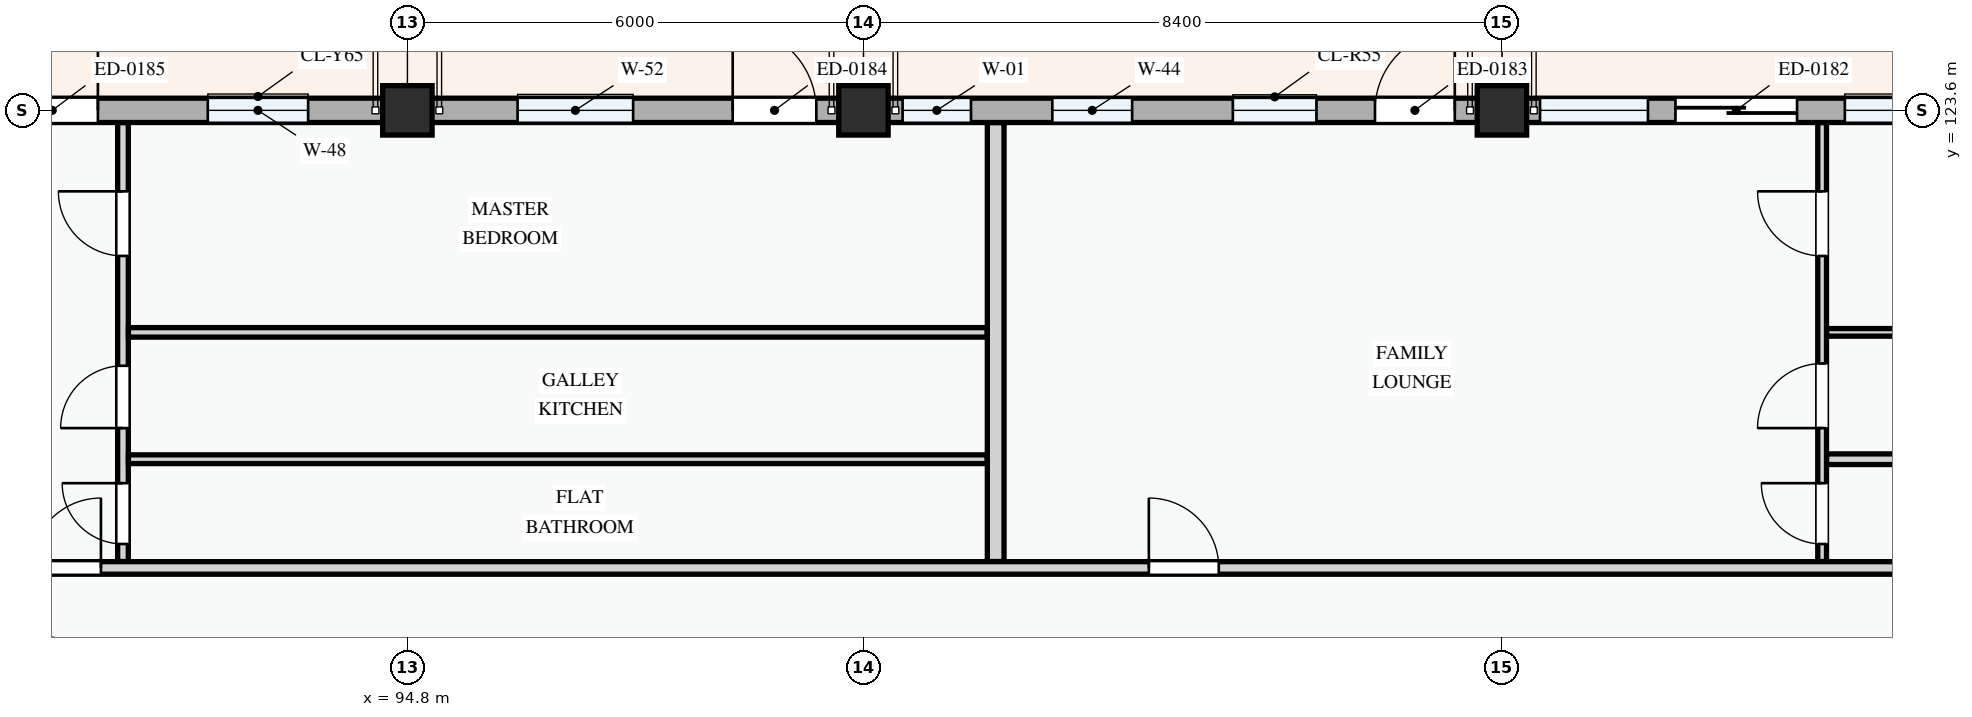
"""IFC4 building model, lengths in metres.
Left out: names, types, materials, properties, quantities, classifications, styles, units other than length and angle.
Written with IfcOpenShell. Run it as: python <this file> out.ifc"""

import sys

from ifc_helpers import new_model, si_unit, direction, frame, frame_2d, origin, origin_2d, place, context, subcontext, project, spatial, rectangle, extrude, element, fill, save


model = new_model("IFC4")
c1 = context("Model", 3, precision=1e-05, world=origin(), true_north=direction((0.0, 1.0)))
c2 = subcontext(c1, "Body", "Model", "MODEL_VIEW")
j1 = project(units=[si_unit("LENGTHUNIT", "METRE"), si_unit("PLANEANGLEUNIT", "RADIAN")], contexts=[c1])
p1 = place(None, origin())
s1 = spatial("IfcSite", under=j1, at=p1, CompositionType="ELEMENT")
p2 = place(p1, origin())
s2 = spatial("IfcBuilding", under=s1, at=p2, CompositionType="ELEMENT")
p3 = place(p2, frame((0.0, 0.0, 18.0)))
s3 = spatial("IfcBuildingStorey", under=s2, at=p3, CompositionType="ELEMENT", Elevation=18.0)
for number, where, z_axis, x_axis in (
    (1, (94.8, 123.6, 0.0), (0.0, 0.0, 1.0), (1.0, 0.0, 0.0)),
    (2, (100.8, 123.6, 0.0), (0.0, 0.0, 1.0), (1.0, 0.0, 0.0)),
    (3, (109.2, 123.6, 0.0), (0.0, 0.0, 1.0), (1.0, 0.0, 0.0)),
):
    element("IfcColumn", number, at=place(p3, frame(where, z_axis=z_axis, x_axis=x_axis)), inside=s3, PredefinedType="COLUMN", context=c2, shape_type="SweptSolid", body=[
        extrude(rectangle(XDim=0.65, YDim=0.65, at=origin_2d()), origin(), (0.0, 0.0, 1.0), 3.3),
    ])
p4 = place(p3, frame((115.2, 123.6, 0.0), z_axis=(0.0, 0.0, 1.0), x_axis=(-1.0, 0.0, 0.0)))
e4 = element("IfcWall", 4, at=p4, inside=s3, PredefinedType="STANDARD", context=c2, shape_type="SweptSolid", body=[
    extrude(rectangle(XDim=6.0, YDim=0.32, at=frame_2d((3.0, 0.0))), origin(), (0.0, 0.0, 1.0), 2.475),
])
p5 = place(p4, frame((2.117, 0.0, 0.0)))
e5 = element("IfcOpeningElement", 5, at=p5, cuts=e4, PredefinedType="OPENING", context=c2, shape_type="SweptSolid", body=[
    extrude(rectangle(XDim=1.6, YDim=2.2, at=frame_2d((0.8, 1.1))), frame((0.0, 0.17, 0.0), z_axis=(0.0, -1.0, 0.0), x_axis=(1.0, 0.0, 0.0)), (0.0, 0.0, 1.0), 0.34),
])
p6 = place(p4, frame((0.489, 0.0, 0.78)))
e6 = element("IfcOpeningElement", 6, at=p6, cuts=e4, PredefinedType="OPENING", context=c2, shape_type="SweptSolid", body=[
    extrude(rectangle(XDim=1.0, YDim=1.25, at=frame_2d((0.5, 0.625))), frame((0.0, 0.17, 0.0), z_axis=(0.0, -1.0, 0.0), x_axis=(1.0, 0.0, 0.0)), (0.0, 0.0, 1.0), 0.34),
])
p7 = place(p4, frame((4.079, 0.0, 0.78)))
e7 = element("IfcOpeningElement", 7, at=p7, cuts=e4, PredefinedType="OPENING", context=c2, shape_type="SweptSolid", body=[
    extrude(rectangle(XDim=1.42, YDim=1.38, at=frame_2d((0.71, 0.69))), frame((0.0, 0.17, 0.0), z_axis=(0.0, -1.0, 0.0), x_axis=(1.0, 0.0, 0.0)), (0.0, 0.0, 1.0), 0.34),
])
p8 = place(p3, frame((109.2, 123.6, 0.0), z_axis=(0.0, 0.0, 1.0), x_axis=(-1.0, 0.0, 0.0)))
e8 = element("IfcWall", 8, at=p8, inside=s3, PredefinedType="STANDARD", context=c2, shape_type="SweptSolid", body=[
    extrude(rectangle(XDim=8.4, YDim=0.32, at=frame_2d((4.2, 0.0))), origin(), (0.0, 0.0, 1.0), 2.375),
])
p9 = place(p8, frame((0.62, 0.0, 0.0)))
e9 = element("IfcOpeningElement", 9, at=p9, cuts=e8, PredefinedType="OPENING", context=c2, shape_type="SweptSolid", body=[
    extrude(rectangle(XDim=1.05, YDim=2.15, at=frame_2d((0.525, 1.075))), frame((0.0, 0.17, 0.0), z_axis=(0.0, -1.0, 0.0), x_axis=(1.0, 0.0, 0.0)), (0.0, 0.0, 1.0), 0.34),
])
p10 = place(p8, frame((2.44, 0.0, 0.78)))
e10 = element("IfcOpeningElement", 10, at=p10, cuts=e8, PredefinedType="OPENING", context=c2, shape_type="SweptSolid", body=[
    extrude(rectangle(XDim=1.1, YDim=1.3, at=frame_2d((0.55, 0.65))), frame((0.0, 0.17, 0.0), z_axis=(0.0, -1.0, 0.0), x_axis=(1.0, 0.0, 0.0)), (0.0, 0.0, 1.0), 0.34),
])
p11 = place(p8, frame((4.865, 0.0, 0.78)))
e11 = element("IfcOpeningElement", 11, at=p11, cuts=e8, PredefinedType="OPENING", context=c2, shape_type="SweptSolid", body=[
    extrude(rectangle(XDim=1.05, YDim=1.2, at=frame_2d((0.525, 0.6))), frame((0.0, 0.17, 0.0), z_axis=(0.0, -1.0, 0.0), x_axis=(1.0, 0.0, 0.0)), (0.0, 0.0, 1.0), 0.34),
])
p12 = place(p8, frame((6.985, 0.0, 0.78)))
e12 = element("IfcOpeningElement", 12, at=p12, cuts=e8, PredefinedType="OPENING", context=c2, shape_type="SweptSolid", body=[
    extrude(rectangle(XDim=0.9, YDim=1.2, at=frame_2d((0.45, 0.6))), frame((0.0, 0.17, 0.0), z_axis=(0.0, -1.0, 0.0), x_axis=(1.0, 0.0, 0.0)), (0.0, 0.0, 1.0), 0.34),
])
p13 = place(p3, frame((100.8, 123.6, 0.0), z_axis=(0.0, 0.0, 1.0), x_axis=(-1.0, 0.0, 0.0)))
e13 = element("IfcWall", 13, at=p13, inside=s3, PredefinedType="STANDARD", context=c2, shape_type="SweptSolid", body=[
    extrude(rectangle(XDim=6.0, YDim=0.32, at=frame_2d((3.0, 0.0))), origin(), (0.0, 0.0, 1.0), 2.475),
])
p14 = place(p13, frame((0.62, 0.0, 0.0)))
e14 = element("IfcOpeningElement", 14, at=p14, cuts=e13, PredefinedType="OPENING", context=c2, shape_type="SweptSolid", body=[
    extrude(rectangle(XDim=1.1, YDim=2.15, at=frame_2d((0.55, 1.075))), frame((0.0, 0.17, 0.0), z_axis=(0.0, -1.0, 0.0), x_axis=(1.0, 0.0, 0.0)), (0.0, 0.0, 1.0), 0.34),
])
p15 = place(p13, frame((3.03, 0.0, 0.78)))
e15 = element("IfcOpeningElement", 15, at=p15, cuts=e13, PredefinedType="OPENING", context=c2, shape_type="SweptSolid", body=[
    extrude(rectangle(XDim=1.52, YDim=1.42, at=frame_2d((0.76, 0.71))), frame((0.0, 0.17, 0.0), z_axis=(0.0, -1.0, 0.0), x_axis=(1.0, 0.0, 0.0)), (0.0, 0.0, 1.0), 0.34),
])
p16 = place(p3, frame((94.8, 123.6, 0.0), z_axis=(0.0, 0.0, 1.0), x_axis=(-1.0, 0.0, 0.0)))
e16 = element("IfcWall", 16, at=p16, inside=s3, PredefinedType="STANDARD", context=c2, shape_type="SweptSolid", body=[
    extrude(rectangle(XDim=8.4, YDim=0.32, at=frame_2d((4.2, 0.0))), origin(), (0.0, 0.0, 1.0), 2.375),
])
p17 = place(p16, frame((4.072, 0.0, 0.0)))
e17 = element("IfcOpeningElement", 17, at=p17, cuts=e16, PredefinedType="OPENING", context=c2, shape_type="SweptSolid", body=[
    extrude(rectangle(XDim=1.2, YDim=2.15, at=frame_2d((0.6, 1.075))), frame((0.0, 0.17, 0.0), z_axis=(0.0, -1.0, 0.0), x_axis=(1.0, 0.0, 0.0)), (0.0, 0.0, 1.0), 0.34),
])
p18 = place(p16, frame((1.306, 0.0, 0.78)))
e18 = element("IfcOpeningElement", 18, at=p18, cuts=e16, PredefinedType="OPENING", context=c2, shape_type="SweptSolid", body=[
    extrude(rectangle(XDim=1.32, YDim=1.35, at=frame_2d((0.66, 0.675))), frame((0.0, 0.17, 0.0), z_axis=(0.0, -1.0, 0.0), x_axis=(1.0, 0.0, 0.0)), (0.0, 0.0, 1.0), 0.34),
])
p19 = place(p16, frame((6.141, 0.0, 0.78)))
e19 = element("IfcOpeningElement", 19, at=p19, cuts=e16, PredefinedType="OPENING", context=c2, shape_type="SweptSolid", body=[
    extrude(rectangle(XDim=1.25, YDim=1.45, at=frame_2d((0.625, 0.725))), frame((0.0, 0.17, 0.0), z_axis=(0.0, -1.0, 0.0), x_axis=(1.0, 0.0, 0.0)), (0.0, 0.0, 1.0), 0.34),
])
p20 = place(p3, frame((91.058, 117.665, 0.0), z_axis=(0.0, 0.0, 1.0), x_axis=(0.0, 1.0, 0.0)))
e20 = element("IfcWall", 20, at=p20, inside=s3, PredefinedType="PARTITIONING", context=c2, shape_type="SweptSolid", body=[
    extrude(rectangle(XDim=5.773, YDim=0.14, at=frame_2d((2.887, 0.0))), origin(), (0.0, 0.0, 1.0), 3.0),
])
p21 = place(p20, frame((0.231, 0.0, 0.0)))
e21 = element("IfcOpeningElement", 21, at=p21, cuts=e20, PredefinedType="OPENING", context=c2, shape_type="SweptSolid", body=[
    extrude(rectangle(XDim=0.8, YDim=2.1, at=frame_2d((0.4, 1.05))), frame((0.0, 0.08, 0.0), z_axis=(0.0, -1.0, 0.0), x_axis=(1.0, 0.0, 0.0)), (0.0, 0.0, 1.0), 0.16),
])
p22 = place(p20, frame((1.755, 0.0, 0.0)))
e22 = element("IfcOpeningElement", 22, at=p22, cuts=e20, PredefinedType="OPENING", context=c2, shape_type="SweptSolid", body=[
    extrude(rectangle(XDim=0.82, YDim=2.08, at=frame_2d((0.41, 1.04))), frame((0.0, 0.08, 0.0), z_axis=(0.0, -1.0, 0.0), x_axis=(1.0, 0.0, 0.0)), (0.0, 0.0, 1.0), 0.16),
])
p23 = place(p20, frame((4.02, 0.0, 0.0)))
e23 = element("IfcOpeningElement", 23, at=p23, cuts=e20, PredefinedType="OPENING", context=c2, shape_type="SweptSolid", body=[
    extrude(rectangle(XDim=0.85, YDim=2.1, at=frame_2d((0.425, 1.05))), frame((0.0, 0.08, 0.0), z_axis=(0.0, -1.0, 0.0), x_axis=(1.0, 0.0, 0.0)), (0.0, 0.0, 1.0), 0.16),
])
p24 = place(p3, frame((91.13, 120.679, 0.0), z_axis=(0.0, 0.0, 1.0), x_axis=(1.0, 0.0, 0.0)))
e24 = element("IfcWall", 24, at=p24, inside=s3, PredefinedType="PARTITIONING", context=c2, shape_type="SweptSolid", body=[
    extrude(rectangle(XDim=11.298, YDim=0.125, at=frame_2d((5.649, 0.0))), origin(), (0.0, 0.0, 1.0), 3.0),
])
p25 = place(p3, frame((91.13, 119.01, 0.0), z_axis=(0.0, 0.0, 1.0), x_axis=(1.0, 0.0, 0.0)))
e25 = element("IfcWall", 25, at=p25, inside=s3, PredefinedType="PARTITIONING", context=c2, shape_type="SweptSolid", body=[
    extrude(rectangle(XDim=11.298, YDim=0.115, at=frame_2d((5.649, 0.0))), origin(), (0.0, 0.0, 1.0), 3.0),
])
p26 = place(p3, frame((113.413, 117.665, 0.0), z_axis=(0.0, 0.0, 1.0), x_axis=(0.0, 1.0, 0.0)))
e26 = element("IfcWall", 26, at=p26, inside=s3, PredefinedType="PARTITIONING", context=c2, shape_type="SweptSolid", body=[
    extrude(rectangle(XDim=5.773, YDim=0.115, at=frame_2d((2.887, 0.0))), origin(), (0.0, 0.0, 1.0), 3.0),
])
p27 = place(p26, frame((0.231, 0.0, 0.0)))
e27 = element("IfcOpeningElement", 27, at=p27, cuts=e26, PredefinedType="OPENING", context=c2, shape_type="SweptSolid", body=[
    extrude(rectangle(XDim=0.8, YDim=2.1, at=frame_2d((0.4, 1.05))), frame((0.0, 0.067, 0.0), z_axis=(0.0, -1.0, 0.0), x_axis=(1.0, 0.0, 0.0)), (0.0, 0.0, 1.0), 0.135),
])
p28 = place(p26, frame((1.755, 0.0, 0.0)))
e28 = element("IfcOpeningElement", 28, at=p28, cuts=e26, PredefinedType="OPENING", context=c2, shape_type="SweptSolid", body=[
    extrude(rectangle(XDim=0.85, YDim=2.1, at=frame_2d((0.425, 1.05))), frame((0.0, 0.067, 0.0), z_axis=(0.0, -1.0, 0.0), x_axis=(1.0, 0.0, 0.0)), (0.0, 0.0, 1.0), 0.135),
])
p29 = place(p26, frame((4.02, 0.0, 0.0)))
e29 = element("IfcOpeningElement", 29, at=p29, cuts=e26, PredefinedType="OPENING", context=c2, shape_type="SweptSolid", body=[
    extrude(rectangle(XDim=0.85, YDim=2.1, at=frame_2d((0.425, 1.05))), frame((0.0, 0.067, 0.0), z_axis=(0.0, -1.0, 0.0), x_axis=(1.0, 0.0, 0.0)), (0.0, 0.0, 1.0), 0.135),
])
p30 = place(p3, frame((113.472, 120.679, 0.0), z_axis=(0.0, 0.0, 1.0), x_axis=(1.0, 0.0, 0.0)))
e30 = element("IfcWall", 30, at=p30, inside=s3, PredefinedType="PARTITIONING", context=c2, shape_type="SweptSolid", body=[
    extrude(rectangle(XDim=11.826, YDim=0.1, at=frame_2d((5.913, 0.0))), origin(), (0.0, 0.0, 1.0), 3.0),
])
p31 = place(p3, frame((113.472, 119.01, 0.0), z_axis=(0.0, 0.0, 1.0), x_axis=(1.0, 0.0, 0.0)))
e31 = element("IfcWall", 31, at=p31, inside=s3, PredefinedType="PARTITIONING", context=c2, shape_type="SweptSolid", body=[
    extrude(rectangle(XDim=11.826, YDim=0.14, at=frame_2d((5.913, 0.0))), origin(), (0.0, 0.0, 1.0), 3.0),
])
p32 = place(p3, frame((102.54, 117.665, 0.0), z_axis=(0.0, 0.0, 1.0), x_axis=(0.0, 1.0, 0.0)))
e32 = element("IfcWall", 32, at=p32, inside=s3, PredefinedType="PARTITIONING", context=c2, shape_type="SweptSolid", body=[
    extrude(rectangle(XDim=5.773, YDim=0.22, at=frame_2d((2.887, 0.0))), origin(), (0.0, 0.0, 1.0), 3.0),
])
p33 = place(p3, frame((80.562, 117.58, 0.0), z_axis=(0.0, 0.0, 1.0), x_axis=(1.0, 0.0, 0.0)))
e33 = element("IfcWall", 33, at=p33, inside=s3, PredefinedType="PARTITIONING", context=c2, shape_type="SweptSolid", body=[
    extrude(rectangle(XDim=71.978, YDim=0.165, at=frame_2d((35.989, 0.0))), origin(), (0.0, 0.0, 1.0), 3.0),
])
p34 = place(p33, frame((9.286, 0.0, 0.0)))
e34 = element("IfcOpeningElement", 34, at=p34, cuts=e33, PredefinedType="OPENING", context=c2, shape_type="SweptSolid", body=[
    extrude(rectangle(XDim=0.92, YDim=2.1, at=frame_2d((0.46, 1.05))), frame((0.0, 0.093, 0.0), z_axis=(0.0, -1.0, 0.0), x_axis=(1.0, 0.0, 0.0)), (0.0, 0.0, 1.0), 0.185),
])
p35 = place(p33, frame((23.993, 0.0, 0.0)))
e35 = element("IfcOpeningElement", 35, at=p35, cuts=e33, PredefinedType="OPENING", context=c2, shape_type="SweptSolid", body=[
    extrude(rectangle(XDim=0.92, YDim=2.1, at=frame_2d((0.46, 1.05))), frame((0.0, 0.093, 0.0), z_axis=(0.0, -1.0, 0.0), x_axis=(1.0, 0.0, 0.0)), (0.0, 0.0, 1.0), 0.185),
])
p36 = place(p33, frame((52.703, 0.0, 0.0)))
e36 = element("IfcOpeningElement", 36, at=p36, cuts=e33, PredefinedType="OPENING", context=c2, shape_type="SweptSolid", body=[
    extrude(rectangle(XDim=0.96, YDim=2.12, at=frame_2d((0.48, 1.06))), frame((0.0, 0.093, 0.0), z_axis=(0.0, -1.0, 0.0), x_axis=(1.0, 0.0, 0.0)), (0.0, 0.0, 1.0), 0.185),
])
p37 = place(p5, frame((1.6, 0.0, 0.0), z_axis=(0.0, 0.0, 1.0), x_axis=(-1.0, 0.0, 0.0)))
e37 = element("IfcDoor", 37, at=p37, inside=s3, OperationType="SLIDING_TO_LEFT", PredefinedType="DOOR", context=c2, shape_type="SweptSolid", body=[
    extrude(rectangle(XDim=1.6, YDim=2.2, at=frame_2d((0.8, 1.1))), frame((0.0, 0.025, 0.0), z_axis=(0.0, -1.0, 0.0), x_axis=(1.0, 0.0, 0.0)), (0.0, 0.0, 1.0), 0.05),
])
fill(e5, e37)
p38 = place(p6, origin())
e38 = element("IfcWindow", 38, at=p38, inside=s3, PartitioningType="SINGLE_PANEL", PredefinedType="WINDOW", context=c2, shape_type="SweptSolid", body=[
    extrude(rectangle(XDim=1.0, YDim=1.25, at=frame_2d((0.5, 0.625))), frame((0.0, 0.03, 0.0), z_axis=(0.0, -1.0, 0.0), x_axis=(1.0, 0.0, 0.0)), (0.0, 0.0, 1.0), 0.06),
])
fill(e6, e38)
p39 = place(p7, origin())
e39 = element("IfcWindow", 39, at=p39, inside=s3, PartitioningType="SINGLE_PANEL", PredefinedType="WINDOW", context=c2, shape_type="SweptSolid", body=[
    extrude(rectangle(XDim=1.42, YDim=1.38, at=frame_2d((0.71, 0.69))), frame((0.0, 0.03, 0.0), z_axis=(0.0, -1.0, 0.0), x_axis=(1.0, 0.0, 0.0)), (0.0, 0.0, 1.0), 0.06),
])
fill(e7, e39)
p40 = place(p9, frame((1.05, 0.0, 0.0), z_axis=(0.0, 0.0, 1.0), x_axis=(-1.0, 0.0, 0.0)))
e40 = element("IfcDoor", 40, at=p40, inside=s3, OperationType="SINGLE_SWING_RIGHT", PredefinedType="DOOR", context=c2, shape_type="SweptSolid", body=[
    extrude(rectangle(XDim=1.05, YDim=2.15, at=frame_2d((0.525, 1.075))), frame((0.0, 0.025, 0.0), z_axis=(0.0, -1.0, 0.0), x_axis=(1.0, 0.0, 0.0)), (0.0, 0.0, 1.0), 0.05),
])
fill(e9, e40)
p41 = place(p10, origin())
e41 = element("IfcWindow", 41, at=p41, inside=s3, PartitioningType="SINGLE_PANEL", PredefinedType="WINDOW", context=c2, shape_type="SweptSolid", body=[
    extrude(rectangle(XDim=1.1, YDim=1.3, at=frame_2d((0.55, 0.65))), frame((0.0, 0.03, 0.0), z_axis=(0.0, -1.0, 0.0), x_axis=(1.0, 0.0, 0.0)), (0.0, 0.0, 1.0), 0.06),
])
fill(e10, e41)
p42 = place(p11, origin())
e42 = element("IfcWindow", 42, at=p42, inside=s3, PartitioningType="SINGLE_PANEL", PredefinedType="WINDOW", context=c2, shape_type="SweptSolid", body=[
    extrude(rectangle(XDim=1.05, YDim=1.2, at=frame_2d((0.525, 0.6))), frame((0.0, 0.03, 0.0), z_axis=(0.0, -1.0, 0.0), x_axis=(1.0, 0.0, 0.0)), (0.0, 0.0, 1.0), 0.06),
])
fill(e11, e42)
p43 = place(p12, origin())
e43 = element("IfcWindow", 43, at=p43, inside=s3, PartitioningType="SINGLE_PANEL", PredefinedType="WINDOW", context=c2, shape_type="SweptSolid", body=[
    extrude(rectangle(XDim=0.9, YDim=1.2, at=frame_2d((0.45, 0.6))), frame((0.0, 0.03, 0.0), z_axis=(0.0, -1.0, 0.0), x_axis=(1.0, 0.0, 0.0)), (0.0, 0.0, 1.0), 0.06),
])
fill(e12, e43)
p44 = place(p14, frame((1.1, 0.0, 0.0), z_axis=(0.0, 0.0, 1.0), x_axis=(-1.0, 0.0, 0.0)))
e44 = element("IfcDoor", 44, at=p44, inside=s3, OperationType="SINGLE_SWING_LEFT", PredefinedType="DOOR", context=c2, shape_type="SweptSolid", body=[
    extrude(rectangle(XDim=1.1, YDim=2.15, at=frame_2d((0.55, 1.075))), frame((0.0, 0.025, 0.0), z_axis=(0.0, -1.0, 0.0), x_axis=(1.0, 0.0, 0.0)), (0.0, 0.0, 1.0), 0.05),
])
fill(e14, e44)
p45 = place(p15, origin())
e45 = element("IfcWindow", 45, at=p45, inside=s3, PartitioningType="SINGLE_PANEL", PredefinedType="WINDOW", context=c2, shape_type="SweptSolid", body=[
    extrude(rectangle(XDim=1.52, YDim=1.42, at=frame_2d((0.76, 0.71))), frame((0.0, 0.03, 0.0), z_axis=(0.0, -1.0, 0.0), x_axis=(1.0, 0.0, 0.0)), (0.0, 0.0, 1.0), 0.06),
])
fill(e15, e45)
p46 = place(p17, frame((1.2, 0.0, 0.0), z_axis=(0.0, 0.0, 1.0), x_axis=(-1.0, 0.0, 0.0)))
e46 = element("IfcDoor", 46, at=p46, inside=s3, OperationType="SINGLE_SWING_RIGHT", PredefinedType="DOOR", context=c2, shape_type="SweptSolid", body=[
    extrude(rectangle(XDim=1.2, YDim=2.15, at=frame_2d((0.6, 1.075))), frame((0.0, 0.025, 0.0), z_axis=(0.0, -1.0, 0.0), x_axis=(1.0, 0.0, 0.0)), (0.0, 0.0, 1.0), 0.05),
])
fill(e17, e46)
p47 = place(p18, origin())
e47 = element("IfcWindow", 47, at=p47, inside=s3, PartitioningType="SINGLE_PANEL", PredefinedType="WINDOW", context=c2, shape_type="SweptSolid", body=[
    extrude(rectangle(XDim=1.32, YDim=1.35, at=frame_2d((0.66, 0.675))), frame((0.0, 0.03, 0.0), z_axis=(0.0, -1.0, 0.0), x_axis=(1.0, 0.0, 0.0)), (0.0, 0.0, 1.0), 0.06),
])
fill(e18, e47)
p48 = place(p21, origin())
e48 = element("IfcDoor", 48, at=p48, inside=s3, OperationType="SINGLE_SWING_RIGHT", PredefinedType="DOOR", context=c2, shape_type="SweptSolid", body=[
    extrude(rectangle(XDim=0.8, YDim=2.1, at=frame_2d((0.4, 1.05))), frame((0.0, 0.025, 0.0), z_axis=(0.0, -1.0, 0.0), x_axis=(1.0, 0.0, 0.0)), (0.0, 0.0, 1.0), 0.05),
])
fill(e21, e48)
p49 = place(p22, origin())
e49 = element("IfcDoor", 49, at=p49, inside=s3, OperationType="SINGLE_SWING_LEFT", PredefinedType="DOOR", context=c2, shape_type="SweptSolid", body=[
    extrude(rectangle(XDim=0.82, YDim=2.08, at=frame_2d((0.41, 1.04))), frame((0.0, 0.025, 0.0), z_axis=(0.0, -1.0, 0.0), x_axis=(1.0, 0.0, 0.0)), (0.0, 0.0, 1.0), 0.05),
])
fill(e22, e49)
p50 = place(p23, origin())
e50 = element("IfcDoor", 50, at=p50, inside=s3, OperationType="SINGLE_SWING_RIGHT", PredefinedType="DOOR", context=c2, shape_type="SweptSolid", body=[
    extrude(rectangle(XDim=0.85, YDim=2.1, at=frame_2d((0.425, 1.05))), frame((0.0, 0.025, 0.0), z_axis=(0.0, -1.0, 0.0), x_axis=(1.0, 0.0, 0.0)), (0.0, 0.0, 1.0), 0.05),
])
fill(e23, e50)
p51 = place(p27, origin())
e51 = element("IfcDoor", 51, at=p51, inside=s3, OperationType="SINGLE_SWING_RIGHT", PredefinedType="DOOR", context=c2, shape_type="SweptSolid", body=[
    extrude(rectangle(XDim=0.8, YDim=2.1, at=frame_2d((0.4, 1.05))), frame((0.0, 0.025, 0.0), z_axis=(0.0, -1.0, 0.0), x_axis=(1.0, 0.0, 0.0)), (0.0, 0.0, 1.0), 0.05),
])
fill(e27, e51)
p52 = place(p28, origin())
e52 = element("IfcDoor", 52, at=p52, inside=s3, OperationType="SINGLE_SWING_LEFT", PredefinedType="DOOR", context=c2, shape_type="SweptSolid", body=[
    extrude(rectangle(XDim=0.85, YDim=2.1, at=frame_2d((0.425, 1.05))), frame((0.0, 0.025, 0.0), z_axis=(0.0, -1.0, 0.0), x_axis=(1.0, 0.0, 0.0)), (0.0, 0.0, 1.0), 0.05),
])
fill(e28, e52)
p53 = place(p29, origin())
e53 = element("IfcDoor", 53, at=p53, inside=s3, OperationType="SINGLE_SWING_RIGHT", PredefinedType="DOOR", context=c2, shape_type="SweptSolid", body=[
    extrude(rectangle(XDim=0.85, YDim=2.1, at=frame_2d((0.425, 1.05))), frame((0.0, 0.025, 0.0), z_axis=(0.0, -1.0, 0.0), x_axis=(1.0, 0.0, 0.0)), (0.0, 0.0, 1.0), 0.05),
])
fill(e29, e53)
p54 = place(p34, origin())
e54 = element("IfcDoor", 54, at=p54, inside=s3, OperationType="SINGLE_SWING_RIGHT", PredefinedType="DOOR", context=c2, shape_type="SweptSolid", body=[
    extrude(rectangle(XDim=0.92, YDim=2.1, at=frame_2d((0.46, 1.05))), frame((0.0, 0.025, 0.0), z_axis=(0.0, -1.0, 0.0), x_axis=(1.0, 0.0, 0.0)), (0.0, 0.0, 1.0), 0.05),
])
fill(e34, e54)
p55 = place(p35, origin())
e55 = element("IfcDoor", 55, at=p55, inside=s3, OperationType="SINGLE_SWING_LEFT", PredefinedType="DOOR", context=c2, shape_type="SweptSolid", body=[
    extrude(rectangle(XDim=0.92, YDim=2.1, at=frame_2d((0.46, 1.05))), frame((0.0, 0.025, 0.0), z_axis=(0.0, -1.0, 0.0), x_axis=(1.0, 0.0, 0.0)), (0.0, 0.0, 1.0), 0.05),
])
fill(e35, e55)
save(model, sys.argv[1])
